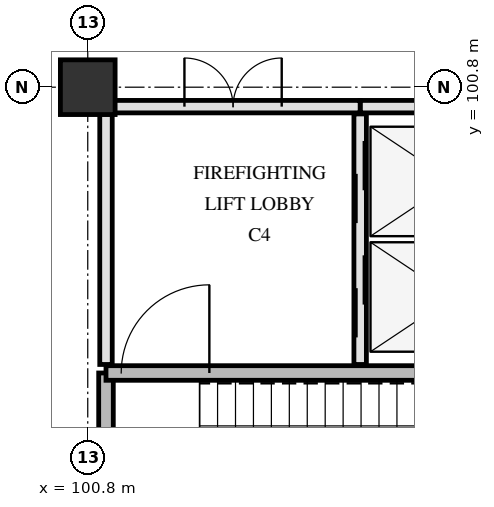
"""IFC4 building model, lengths in metres.
Left out: names, types, materials, properties, quantities, classifications, styles, units other than length and angle.
Written with IfcOpenShell. Run it as: python <this file> out.ifc"""

import sys

from ifc_helpers import new_model, si_unit, direction, frame, frame_2d, origin, origin_2d, place, context, subcontext, project, spatial, rectangle, extrude, element, fill, save


model = new_model("IFC4")
c1 = context("Model", 3, precision=1e-05, world=origin(), true_north=direction((0.0, 1.0)))
c2 = subcontext(c1, "Body", "Model", "MODEL_VIEW")
j1 = project(units=[si_unit("LENGTHUNIT", "METRE"), si_unit("PLANEANGLEUNIT", "RADIAN")], contexts=[c1])
p1 = place(None, origin())
s1 = spatial("IfcSite", under=j1, at=p1, CompositionType="ELEMENT")
p2 = place(p1, origin())
s2 = spatial("IfcBuilding", under=s1, at=p2, CompositionType="ELEMENT")
p3 = place(p2, frame((0.0, 0.0, -5.4)))
s3 = spatial("IfcBuildingStorey", under=s2, at=p3, CompositionType="ELEMENT", Elevation=-5.4)
p4 = place(p3, frame((100.8, 100.8, 0.0), z_axis=(0.0, 0.0, 1.0), x_axis=(1.0, 0.0, 0.0)))
e1 = element("IfcColumn", 1, at=p4, inside=s3, PredefinedType="COLUMN", context=c2, shape_type="SweptSolid", body=[
    extrude(rectangle(XDim=0.9, YDim=0.9, at=origin_2d()), origin(), (0.0, 0.0, 1.0), 5.4),
])
p5 = place(p3, frame((101.1, 92.78, 0.0), z_axis=(0.0, 0.0, 1.0), x_axis=(0.0, 1.0, 0.0)))
e2 = element("IfcWall", 2, at=p5, inside=s3, PredefinedType="SHEAR", context=c2, shape_type="SweptSolid", body=[
    extrude(rectangle(XDim=3.32, YDim=0.24, at=frame_2d((1.66, 0.0))), origin(), (0.0, 0.0, 1.0), 5.08),
])
p6 = place(p3, frame((101.1, 96.1, 0.0), z_axis=(0.0, 0.0, 1.0), x_axis=(1.0, 0.0, 0.0)))
e3 = element("IfcWall", 3, at=p6, inside=s3, PredefinedType="SHEAR", context=c2, shape_type="SweptSolid", body=[
    extrude(rectangle(XDim=7.82, YDim=0.24, at=frame_2d((3.91, 0.0))), origin(), (0.0, 0.0, 1.0), 5.08),
])
p7 = place(p6, frame((0.25, 0.0, 0.0)))
e4 = element("IfcOpeningElement", 4, at=p7, cuts=e3, PredefinedType="OPENING", context=c2, shape_type="SweptSolid", body=[
    extrude(rectangle(XDim=1.45, YDim=2.2, at=frame_2d((0.725, 1.1))), frame((0.0, 0.13, 0.0), z_axis=(0.0, -1.0, 0.0), x_axis=(1.0, 0.0, 0.0)), (0.0, 0.0, 1.0), 0.26),
])
p8 = place(p3, frame((105.28, 96.24, 0.0), z_axis=(0.0, 0.0, 1.0), x_axis=(0.0, 1.0, 0.0)))
e5 = element("IfcWall", 5, at=p8, inside=s3, PredefinedType="PARTITIONING", context=c2, shape_type="SweptSolid", body=[
    extrude(rectangle(XDim=4.12, YDim=0.205, at=frame_2d((2.06, 0.0))), origin(), (0.0, 0.0, 1.0), 5.07),
])
p9 = place(p8, frame((0.445, 0.0, 0.0)))
e6 = element("IfcOpeningElement", 6, at=p9, cuts=e5, PredefinedType="OPENING", context=c2, shape_type="SweptSolid", body=[
    extrude(rectangle(XDim=1.35, YDim=2.2, at=frame_2d((0.675, 1.1))), frame((0.0, 0.113, 0.0), z_axis=(0.0, -1.0, 0.0), x_axis=(1.0, 0.0, 0.0)), (0.0, 0.0, 1.0), 0.225),
])
p10 = place(p8, frame((2.325, 0.0, 0.0)))
e7 = element("IfcOpeningElement", 7, at=p10, cuts=e5, PredefinedType="OPENING", context=c2, shape_type="SweptSolid", body=[
    extrude(rectangle(XDim=1.35, YDim=2.2, at=frame_2d((0.675, 1.1))), frame((0.0, 0.113, 0.0), z_axis=(0.0, -1.0, 0.0), x_axis=(1.0, 0.0, 0.0)), (0.0, 0.0, 1.0), 0.225),
])
p11 = place(p3, frame((105.28, 100.48, 0.0), z_axis=(0.0, 0.0, 1.0), x_axis=(1.0, 0.0, 0.0)))
e8 = element("IfcWall", 8, at=p11, inside=s3, PredefinedType="PARTITIONING", context=c2, shape_type="SweptSolid", body=[
    extrude(rectangle(XDim=3.57, YDim=0.205, at=frame_2d((1.785, 0.0))), origin(), (0.0, 0.0, 1.0), 4.42),
])
p12 = place(p3, frame((101.1, 96.24, 0.0), z_axis=(0.0, 0.0, 1.0), x_axis=(0.0, 1.0, 0.0)))
e9 = element("IfcWall", 9, at=p12, inside=s3, PredefinedType="PARTITIONING", context=c2, shape_type="SweptSolid", body=[
    extrude(rectangle(XDim=4.12, YDim=0.205, at=frame_2d((2.06, 0.0))), origin(), (0.0, 0.0, 1.0), 4.47),
])
p13 = place(p3, frame((101.1, 100.48, 0.0), z_axis=(0.0, 0.0, 1.0), x_axis=(1.0, 0.0, 0.0)))
e10 = element("IfcWall", 10, at=p13, inside=s3, PredefinedType="PARTITIONING", context=c2, shape_type="SweptSolid", body=[
    extrude(rectangle(XDim=4.18, YDim=0.205, at=frame_2d((2.09, 0.0))), origin(), (0.0, 0.0, 1.0), 4.42),
])
p14 = place(p13, frame((1.29, 0.0, 0.0)))
e11 = element("IfcOpeningElement", 11, at=p14, cuts=e10, PredefinedType="OPENING", context=c2, shape_type="SweptSolid", body=[
    extrude(rectangle(XDim=1.6, YDim=2.25, at=frame_2d((0.8, 1.125))), frame((0.0, 0.113, 0.0), z_axis=(0.0, -1.0, 0.0), x_axis=(1.0, 0.0, 0.0)), (0.0, 0.0, 1.0), 0.225),
])
p15 = place(p7, origin())
e12 = element("IfcDoor", 12, at=p15, inside=s3, OperationType="SINGLE_SWING_RIGHT", PredefinedType="DOOR", context=c2, shape_type="SweptSolid", body=[
    extrude(rectangle(XDim=1.45, YDim=2.2, at=frame_2d((0.725, 1.1))), frame((0.0, 0.025, 0.0), z_axis=(0.0, -1.0, 0.0), x_axis=(1.0, 0.0, 0.0)), (0.0, 0.0, 1.0), 0.05),
])
fill(e4, e12)
p16 = place(p9, origin())
e13 = element("IfcDoor", 13, at=p16, inside=s3, OperationType="SLIDING_TO_LEFT", PredefinedType="DOOR", context=c2, shape_type="SweptSolid", body=[
    extrude(rectangle(XDim=1.35, YDim=2.2, at=frame_2d((0.675, 1.1))), frame((0.0, 0.025, 0.0), z_axis=(0.0, -1.0, 0.0), x_axis=(1.0, 0.0, 0.0)), (0.0, 0.0, 1.0), 0.05),
])
fill(e6, e13)
p17 = place(p10, origin())
e14 = element("IfcDoor", 14, at=p17, inside=s3, OperationType="SLIDING_TO_LEFT", PredefinedType="DOOR", context=c2, shape_type="SweptSolid", body=[
    extrude(rectangle(XDim=1.35, YDim=2.2, at=frame_2d((0.675, 1.1))), frame((0.0, 0.025, 0.0), z_axis=(0.0, -1.0, 0.0), x_axis=(1.0, 0.0, 0.0)), (0.0, 0.0, 1.0), 0.05),
])
fill(e7, e14)
p18 = place(p14, origin())
e15 = element("IfcDoor", 15, at=p18, inside=s3, OperationType="DOUBLE_SWING_LEFT", PredefinedType="DOOR", context=c2, shape_type="SweptSolid", body=[
    extrude(rectangle(XDim=1.6, YDim=2.25, at=frame_2d((0.8, 1.125))), frame((0.0, 0.025, 0.0), z_axis=(0.0, -1.0, 0.0), x_axis=(1.0, 0.0, 0.0)), (0.0, 0.0, 1.0), 0.05),
])
fill(e11, e15)
save(model, sys.argv[1])
